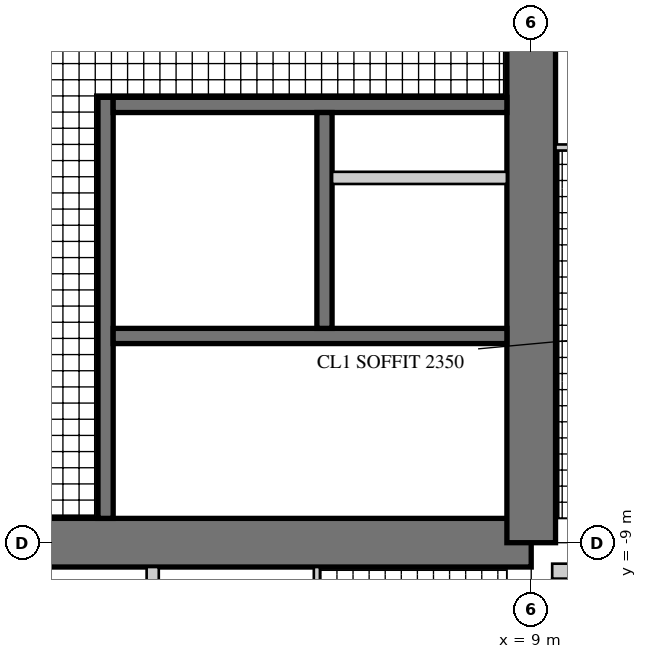
"""IFC4 building model, lengths in metres.
Left out: names, types, materials, properties, quantities, classifications, styles, units other than length and angle.
Written with IfcOpenShell. Run it as: python <this file> out.ifc"""

import sys

from ifc_helpers import new_model, si_unit, direction, frame, frame_2d, origin, place, context, subcontext, project, spatial, rectangle, extrude, element, fill, save


model = new_model("IFC4")
c1 = context("Model", 3, precision=1e-05, world=origin(), true_north=direction((0.0, 1.0)))
c2 = subcontext(c1, "Body", "Model", "MODEL_VIEW")
j1 = project(units=[si_unit("LENGTHUNIT", "METRE"), si_unit("PLANEANGLEUNIT", "RADIAN")], contexts=[c1])
p1 = place(None, origin())
s1 = spatial("IfcSite", under=j1, at=p1, CompositionType="ELEMENT")
p2 = place(p1, origin())
s2 = spatial("IfcBuilding", under=s1, at=p2, CompositionType="ELEMENT")
p3 = place(p2, frame((0.0, 0.0, 278.1)))
s3 = spatial("IfcBuildingStorey", under=s2, at=p3, CompositionType="ELEMENT", Elevation=278.1)
p4 = place(p3, frame((-9.0, -9.0, 0.0), z_axis=(0.0, 0.0, 1.0), x_axis=(1.0, 0.0, 0.0)))
e1 = element("IfcWall", 1, at=p4, inside=s3, PredefinedType="SHEAR", context=c2, shape_type="SweptSolid", body=[
    extrude(rectangle(XDim=18.0, YDim=0.8, at=frame_2d((9.0, 0.0))), origin(), (0.0, 0.0, 1.0), 3.4),
])
p5 = place(p4, frame((9.8, 0.0, 0.0)))
e2 = element("IfcOpeningElement", 2, at=p5, cuts=e1, PredefinedType="OPENING", context=c2, shape_type="SweptSolid", body=[
    extrude(rectangle(XDim=1.0, YDim=2.4, at=frame_2d((0.5, 1.2))), frame((0.0, 0.41, 0.0), z_axis=(0.0, -1.0, 0.0), x_axis=(1.0, 0.0, 0.0)), (0.0, 0.0, 1.0), 0.82),
])
p6 = place(p3, frame((9.0, -9.0, 0.0), z_axis=(0.0, 0.0, 1.0), x_axis=(0.0, 1.0, 0.0)))
e3 = element("IfcWall", 3, at=p6, inside=s3, PredefinedType="SHEAR", context=c2, shape_type="SweptSolid", body=[
    extrude(rectangle(XDim=18.0, YDim=0.8, at=frame_2d((9.0, 0.0))), origin(), (0.0, 0.0, 1.0), 3.4),
])
p7 = place(p6, frame((9.8, 0.0, 0.0)))
e4 = element("IfcOpeningElement", 4, at=p7, cuts=e3, PredefinedType="OPENING", context=c2, shape_type="SweptSolid", body=[
    extrude(rectangle(XDim=1.0, YDim=2.4, at=frame_2d((0.5, 1.2))), frame((0.0, 0.41, 0.0), z_axis=(0.0, -1.0, 0.0), x_axis=(1.0, 0.0, 0.0)), (0.0, 0.0, 1.0), 0.82),
])
p8 = place(p3, frame((2.0, -1.675, 0.0), z_axis=(0.0, 0.0, 1.0), x_axis=(0.0, -1.0, 0.0)))
e5 = element("IfcWall", 5, at=p8, inside=s3, PredefinedType="SHEAR", context=c2, shape_type="SweptSolid", body=[
    extrude(rectangle(XDim=6.925, YDim=0.25, at=frame_2d((3.462, 0.0))), origin(), (0.0, 0.0, 1.0), 3.4),
])
p9 = place(p8, frame((0.725, 0.0, 0.0)))
e6 = element("IfcOpeningElement", 6, at=p9, cuts=e5, PredefinedType="OPENING", context=c2, shape_type="SweptSolid", body=[
    extrude(rectangle(XDim=1.0, YDim=2.1, at=frame_2d((0.5, 1.05))), frame((0.0, 0.135, 0.0), z_axis=(0.0, -1.0, 0.0), x_axis=(1.0, 0.0, 0.0)), (0.0, 0.0, 1.0), 0.27),
])
p10 = place(p3, frame((2.125, -1.8, 0.0), z_axis=(0.0, 0.0, 1.0), x_axis=(1.0, 0.0, 0.0)))
e7 = element("IfcWall", 7, at=p10, inside=s3, PredefinedType="SHEAR", context=c2, shape_type="SweptSolid", body=[
    extrude(rectangle(XDim=6.475, YDim=0.25, at=frame_2d((3.238, 0.0))), origin(), (0.0, 0.0, 1.0), 3.4),
])
p11 = place(p3, frame((2.125, -5.6, 0.0), z_axis=(0.0, 0.0, 1.0), x_axis=(1.0, 0.0, 0.0)))
e8 = element("IfcWall", 8, at=p11, inside=s3, PredefinedType="SHEAR", context=c2, shape_type="SweptSolid", body=[
    extrude(rectangle(XDim=6.475, YDim=0.25, at=frame_2d((3.238, 0.0))), origin(), (0.0, 0.0, 1.0), 3.4),
])
p12 = place(p11, frame((0.175, 0.0, 0.0)))
e9 = element("IfcOpeningElement", 9, at=p12, cuts=e8, PredefinedType="OPENING", context=c2, shape_type="SweptSolid", body=[
    extrude(rectangle(XDim=1.0, YDim=2.1, at=frame_2d((0.5, 1.05))), frame((0.0, 0.135, 0.0), z_axis=(0.0, -1.0, 0.0), x_axis=(1.0, 0.0, 0.0)), (0.0, 0.0, 1.0), 0.27),
])
p13 = place(p3, frame((5.6, -1.925, 0.0), z_axis=(0.0, 0.0, 1.0), x_axis=(0.0, -1.0, 0.0)))
e10 = element("IfcWall", 10, at=p13, inside=s3, PredefinedType="SHEAR", context=c2, shape_type="SweptSolid", body=[
    extrude(rectangle(XDim=3.55, YDim=0.25, at=frame_2d((1.775, 0.0))), origin(), (0.0, 0.0, 1.0), 3.4),
])
p14 = place(p13, frame((1.525, 0.0, 0.0)))
e11 = element("IfcOpeningElement", 11, at=p14, cuts=e10, PredefinedType="OPENING", context=c2, shape_type="SweptSolid", body=[
    extrude(rectangle(XDim=1.1, YDim=2.2, at=frame_2d((0.55, 1.1))), frame((0.0, 0.135, 0.0), z_axis=(0.0, -1.0, 0.0), x_axis=(1.0, 0.0, 0.0)), (0.0, 0.0, 1.0), 0.27),
])
p15 = place(p13, frame((0.075, 0.0, 0.0)))
e12 = element("IfcOpeningElement", 12, at=p15, cuts=e10, PredefinedType="OPENING", context=c2, shape_type="SweptSolid", body=[
    extrude(rectangle(XDim=0.8, YDim=2.1, at=frame_2d((0.4, 1.05))), frame((0.0, 0.135, 0.0), z_axis=(0.0, -1.0, 0.0), x_axis=(1.0, 0.0, 0.0)), (0.0, 0.0, 1.0), 0.27),
])
p16 = place(p3, frame((5.725, -3.0, 0.0), z_axis=(0.0, 0.0, 1.0), x_axis=(1.0, 0.0, 0.0)))
e13 = element("IfcWall", 13, at=p16, inside=s3, PredefinedType="PARTITIONING", context=c2, shape_type="SweptSolid", body=[
    extrude(rectangle(XDim=2.875, YDim=0.2, at=frame_2d((1.438, 0.0))), origin(), (0.0, 0.0, 1.0), 3.4),
])
p17 = place(p3, frame((9.345, -9.47, 0.0), z_axis=(0.0, 0.0, 1.0), x_axis=(1.0, 0.0, 0.0)))
e14 = element("IfcWall", 14, at=p17, inside=s3, PredefinedType="SOLIDWALL", context=c2, shape_type="SweptSolid", body=[
    extrude(rectangle(XDim=3.125, YDim=0.25, at=frame_2d((1.562, 0.0))), origin(), (0.0, 0.0, 1.0), 3.22),
])
p18 = place(p17, frame((0.6, 0.0, 0.0)))
e15 = element("IfcOpeningElement", 15, at=p18, cuts=e14, PredefinedType="OPENING", context=c2, shape_type="SweptSolid", body=[
    extrude(rectangle(XDim=1.0, YDim=2.2, at=frame_2d((0.5, 1.1))), frame((0.0, 0.135, 0.0), z_axis=(0.0, -1.0, 0.0), x_axis=(1.0, 0.0, 0.0)), (0.0, 0.0, 1.0), 0.27),
])
p19 = place(p3, frame((9.47, -12.47, 0.0), z_axis=(0.0, 0.0, 1.0), x_axis=(0.0, 1.0, 0.0)))
e16 = element("IfcWall", 16, at=p19, inside=s3, PredefinedType="SOLIDWALL", context=c2, shape_type="SweptSolid", body=[
    extrude(rectangle(XDim=2.875, YDim=0.25, at=frame_2d((1.438, 0.0))), origin(), (0.0, 0.0, 1.0), 3.22),
])
p20 = place(p19, frame((0.6, 0.0, 0.0)))
e17 = element("IfcOpeningElement", 17, at=p20, cuts=e16, PredefinedType="OPENING", context=c2, shape_type="SweptSolid", body=[
    extrude(rectangle(XDim=1.0, YDim=2.2, at=frame_2d((0.5, 1.1))), frame((0.0, 0.135, 0.0), z_axis=(0.0, -1.0, 0.0), x_axis=(1.0, 0.0, 0.0)), (0.0, 0.0, 1.0), 0.27),
])
p21 = place(p3, frame((9.4, -2.5, 0.0), z_axis=(0.0, 0.0, 1.0), x_axis=(1.0, 0.0, 0.0)))
e18 = element("IfcWall", 18, at=p21, inside=s3, PredefinedType="PARTITIONING", context=c2, shape_type="SweptSolid", body=[
    extrude(rectangle(XDim=2.65, YDim=0.1, at=frame_2d((1.325, 0.0))), origin(), (0.0, 0.0, 1.0), 3.22),
])
p22 = place(p3, frame((5.475, -9.4, 0.0), z_axis=(0.0, 0.0, 1.0), x_axis=(0.0, -1.0, 0.0)))
e19 = element("IfcWall", 19, at=p22, inside=s3, PredefinedType="PARTITIONING", context=c2, shape_type="SweptSolid", body=[
    extrude(rectangle(XDim=2.85, YDim=0.1, at=frame_2d((1.425, 0.0))), origin(), (0.0, 0.0, 1.0), 3.22),
])
p23 = place(p3, frame((2.775, -9.4, 0.0), z_axis=(0.0, 0.0, 1.0), x_axis=(0.0, -1.0, 0.0)))
e20 = element("IfcWall", 20, at=p23, inside=s3, PredefinedType="SOLIDWALL", context=c2, shape_type="SweptSolid", body=[
    extrude(rectangle(XDim=5.6, YDim=0.2, at=frame_2d((2.8, 0.0))), origin(), (0.0, 0.0, 1.0), 3.22),
])
p24 = place(p23, frame((3.4, 0.0, 0.0)))
e21 = element("IfcOpeningElement", 21, at=p24, cuts=e20, PredefinedType="OPENING", context=c2, shape_type="SweptSolid", body=[
    extrude(rectangle(XDim=1.0, YDim=2.15, at=frame_2d((0.5, 1.075))), frame((0.0, 0.11, 0.0), z_axis=(0.0, -1.0, 0.0), x_axis=(1.0, 0.0, 0.0)), (0.0, 0.0, 1.0), 0.22),
])
p25 = place(p5, origin())
e22 = element("IfcDoor", 22, at=p25, inside=s3, OperationType="SINGLE_SWING_RIGHT", PredefinedType="DOOR", context=c2, shape_type="SweptSolid", body=[
    extrude(rectangle(XDim=1.0, YDim=2.4, at=frame_2d((0.5, 1.2))), frame((0.0, 0.055, 0.0), z_axis=(0.0, -1.0, 0.0), x_axis=(1.0, 0.0, 0.0)), (0.0, 0.0, 1.0), 0.05),
])
fill(e2, e22)
p26 = place(p9, origin())
e23 = element("IfcDoor", 23, at=p26, inside=s3, OperationType="SINGLE_SWING_LEFT", PredefinedType="DOOR", context=c2, shape_type="SweptSolid", body=[
    extrude(rectangle(XDim=1.0, YDim=2.1, at=frame_2d((0.5, 1.05))), frame((0.0, 0.025, 0.0), z_axis=(0.0, -1.0, 0.0), x_axis=(1.0, 0.0, 0.0)), (0.0, 0.0, 1.0), 0.05),
])
fill(e6, e23)
p27 = place(p12, frame((1.0, 0.0, 0.0), z_axis=(0.0, 0.0, 1.0), x_axis=(-1.0, 0.0, 0.0)))
e24 = element("IfcDoor", 24, at=p27, inside=s3, OperationType="SINGLE_SWING_RIGHT", PredefinedType="DOOR", context=c2, shape_type="SweptSolid", body=[
    extrude(rectangle(XDim=1.0, YDim=2.1, at=frame_2d((0.5, 1.05))), frame((0.0, 0.025, 0.0), z_axis=(0.0, -1.0, 0.0), x_axis=(1.0, 0.0, 0.0)), (0.0, 0.0, 1.0), 0.05),
])
fill(e9, e24)
p28 = place(p14, origin())
e25 = element("IfcDoor", 25, at=p28, inside=s3, OperationType="DOUBLE_DOOR_SLIDING", PredefinedType="DOOR", context=c2, shape_type="SweptSolid", body=[
    extrude(rectangle(XDim=1.1, YDim=2.2, at=frame_2d((0.55, 1.1))), frame((0.0, 0.025, 0.0), z_axis=(0.0, -1.0, 0.0), x_axis=(1.0, 0.0, 0.0)), (0.0, 0.0, 1.0), 0.05),
])
fill(e11, e25)
p29 = place(p15, origin())
e26 = element("IfcDoor", 26, at=p29, inside=s3, OperationType="SINGLE_SWING_LEFT", PredefinedType="DOOR", context=c2, shape_type="SweptSolid", body=[
    extrude(rectangle(XDim=0.8, YDim=2.1, at=frame_2d((0.4, 1.05))), frame((0.0, 0.025, 0.0), z_axis=(0.0, -1.0, 0.0), x_axis=(1.0, 0.0, 0.0)), (0.0, 0.0, 1.0), 0.05),
])
fill(e12, e26)
save(model, sys.argv[1])
